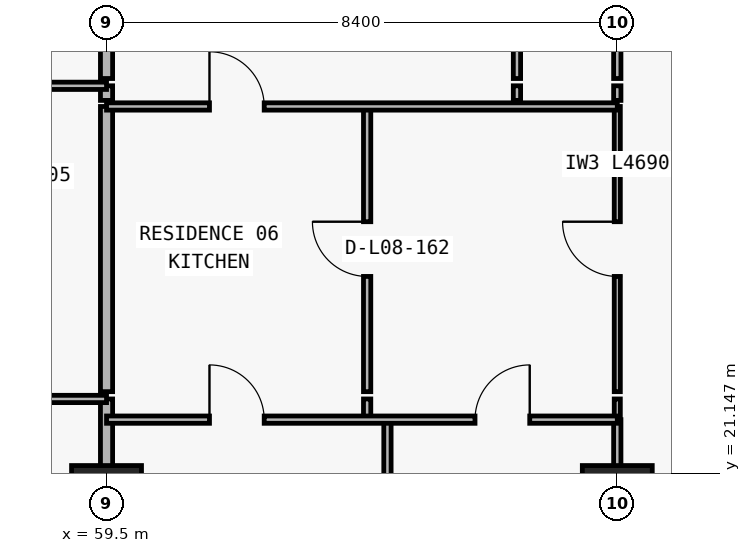
"""IFC4 building model, lengths in metres.
Left out: names, types, materials, properties, quantities, classifications, styles, units other than length and angle.
Written with IfcOpenShell. Run it as: python <this file> out.ifc"""

import sys

from ifc_helpers import new_model, si_unit, direction, frame, frame_2d, origin, origin_2d, place, context, subcontext, project, spatial, rectangle, extrude, element, fill, save


model = new_model("IFC4")
c1 = context("Model", 3, precision=1e-05, world=origin(), true_north=direction((0.0, 1.0)))
c2 = subcontext(c1, "Body", "Model", "MODEL_VIEW")
j1 = project(units=[si_unit("LENGTHUNIT", "METRE"), si_unit("PLANEANGLEUNIT", "RADIAN")], contexts=[c1])
p1 = place(None, origin())
s1 = spatial("IfcSite", under=j1, at=p1, CompositionType="ELEMENT")
p2 = place(p1, origin())
s2 = spatial("IfcBuilding", under=s1, at=p2, CompositionType="ELEMENT")
p3 = place(p2, frame((0.0, 0.0, 36.6)))
s3 = spatial("IfcBuildingStorey", under=s2, at=p3, CompositionType="ELEMENT", Elevation=36.6)
for number, where, z_axis, x_axis in (
    (1, (59.5, 20.8, 0.0), (0.0, 0.0, 1.0), (1.0, 0.0, 0.0)),
    (2, (67.9, 20.8, 0.0), (0.0, 0.0, 1.0), (1.0, 0.0, 0.0)),
):
    element("IfcColumn", number, at=place(p3, frame(where, z_axis=z_axis, x_axis=x_axis)), inside=s3, PredefinedType="COLUMN", context=c2, shape_type="SweptSolid", body=[
        extrude(rectangle(XDim=1.15, YDim=0.95, at=origin_2d()), origin(), (0.0, 0.0, 1.0), 3.05),
    ])
p4 = place(p3, frame((59.5, 6.24, 0.0), z_axis=(0.0, 0.0, 1.0), x_axis=(0.0, 1.0, 0.0)))
e3 = element("IfcWall", 3, at=p4, inside=s3, PredefinedType="PARTITIONING", context=c2, shape_type="SweptSolid", body=[
    extrude(rectangle(XDim=16.13, YDim=0.2, at=frame_2d((8.065, 0.0))), origin(), (0.0, 0.0, 1.0), 2.11),
])
p5 = place(p3, frame((59.5, 22.49, 0.0), z_axis=(0.0, 0.0, 1.0), x_axis=(0.0, 1.0, 0.0)))
e4 = element("IfcWall", 4, at=p5, inside=s3, PredefinedType="PARTITIONING", context=c2, shape_type="SweptSolid", body=[
    extrude(rectangle(XDim=4.69, YDim=0.2, at=frame_2d((2.345, 0.0))), origin(), (0.0, 0.0, 1.0), 2.11),
])
p6 = place(p3, frame((59.5, 27.28, 0.0), z_axis=(0.0, 0.0, 1.0), x_axis=(0.0, 1.0, 0.0)))
e5 = element("IfcWall", 5, at=p6, inside=s3, PredefinedType="PARTITIONING", context=c2, shape_type="SweptSolid", body=[
    extrude(rectangle(XDim=0.24, YDim=0.2, at=frame_2d((0.12, 0.0))), origin(), (0.0, 0.0, 1.0), 2.11),
])
p7 = place(p3, frame((59.5, 27.64, 0.0), z_axis=(0.0, 0.0, 1.0), x_axis=(0.0, 1.0, 0.0)))
e6 = element("IfcWall", 6, at=p7, inside=s3, PredefinedType="PARTITIONING", context=c2, shape_type="SweptSolid", body=[
    extrude(rectangle(XDim=6.86, YDim=0.2, at=frame_2d((3.43, 0.0))), origin(), (0.0, 0.0, 1.0), 2.11),
])
p8 = place(p3, frame((63.786, 22.03, 0.0), z_axis=(0.0, 0.0, 1.0), x_axis=(0.0, 1.0, 0.0)))
e7 = element("IfcWall", 7, at=p8, inside=s3, PredefinedType="PARTITIONING", context=c2, shape_type="SweptSolid", body=[
    extrude(rectangle(XDim=0.34, YDim=0.12, at=frame_2d((0.17, 0.0))), origin(), (0.0, 0.0, 1.0), 3.05),
])
p9 = place(p3, frame((63.786, 22.49, 0.0), z_axis=(0.0, 0.0, 1.0), x_axis=(0.0, 1.0, 0.0)))
e8 = element("IfcWall", 8, at=p9, inside=s3, PredefinedType="PARTITIONING", context=c2, shape_type="SweptSolid", body=[
    extrude(rectangle(XDim=4.69, YDim=0.12, at=frame_2d((2.345, 0.0))), origin(), (0.0, 0.0, 1.0), 3.05),
])
p10 = place(p9, frame((1.895, 0.0, 0.0)))
e9 = element("IfcOpeningElement", 9, at=p10, cuts=e8, PredefinedType="OPENING", context=c2, shape_type="SweptSolid", body=[
    extrude(rectangle(XDim=0.9, YDim=2.15, at=frame_2d((0.45, 1.075))), frame((0.0, 0.07, 0.0), z_axis=(0.0, -1.0, 0.0), x_axis=(1.0, 0.0, 0.0)), (0.0, 0.0, 1.0), 0.14),
])
p11 = place(p3, frame((64.12, 6.24, 0.0), z_axis=(0.0, 0.0, 1.0), x_axis=(0.0, 1.0, 0.0)))
e10 = element("IfcWall", 10, at=p11, inside=s3, PredefinedType="PARTITIONING", context=c2, shape_type="SweptSolid", body=[
    extrude(rectangle(XDim=15.79, YDim=0.12, at=frame_2d((7.895, 0.0))), origin(), (0.0, 0.0, 1.0), 3.05),
])
p12 = place(p3, frame((66.25, 27.28, 0.0), z_axis=(0.0, 0.0, 1.0), x_axis=(0.0, 1.0, 0.0)))
e11 = element("IfcWall", 11, at=p12, inside=s3, PredefinedType="PARTITIONING", context=c2, shape_type="SweptSolid", body=[
    extrude(rectangle(XDim=0.24, YDim=0.12, at=frame_2d((0.12, 0.0))), origin(), (0.0, 0.0, 1.0), 3.05),
])
p13 = place(p3, frame((66.25, 27.64, 0.0), z_axis=(0.0, 0.0, 1.0), x_axis=(0.0, 1.0, 0.0)))
e12 = element("IfcWall", 12, at=p13, inside=s3, PredefinedType="PARTITIONING", context=c2, shape_type="SweptSolid", body=[
    extrude(rectangle(XDim=6.86, YDim=0.12, at=frame_2d((3.43, 0.0))), origin(), (0.0, 0.0, 1.0), 3.05),
])
p14 = place(p13, frame((3.005, 0.0, 0.0)))
e13 = element("IfcOpeningElement", 13, at=p14, cuts=e12, PredefinedType="OPENING", context=c2, shape_type="SweptSolid", body=[
    extrude(rectangle(XDim=0.85, YDim=2.1, at=frame_2d((0.425, 1.05))), frame((0.0, 0.07, 0.0), z_axis=(0.0, -1.0, 0.0), x_axis=(1.0, 0.0, 0.0)), (0.0, 0.0, 1.0), 0.14),
])
p15 = place(p3, frame((67.9, 6.24, 0.0), z_axis=(0.0, 0.0, 1.0), x_axis=(0.0, 1.0, 0.0)))
e14 = element("IfcWall", 14, at=p15, inside=s3, PredefinedType="PARTITIONING", context=c2, shape_type="SweptSolid", body=[
    extrude(rectangle(XDim=15.79, YDim=0.12, at=frame_2d((7.895, 0.0))), origin(), (0.0, 0.0, 1.0), 2.11),
])
p16 = place(p3, frame((67.9, 22.035, 0.0), z_axis=(0.0, 0.0, 1.0), x_axis=(0.0, 1.0, 0.0)))
e15 = element("IfcWall", 15, at=p16, inside=s3, PredefinedType="MOVABLE", context=c2, shape_type="SweptSolid", body=[
    extrude(rectangle(XDim=0.335, YDim=0.1, at=frame_2d((0.167, 0.0))), origin(), (0.0, 0.0, 1.0), 2.11),
])
p17 = place(p3, frame((67.9, 22.49, 0.0), z_axis=(0.0, 0.0, 1.0), x_axis=(0.0, 1.0, 0.0)))
e16 = element("IfcWall", 16, at=p17, inside=s3, PredefinedType="MOVABLE", context=c2, shape_type="SweptSolid", body=[
    extrude(rectangle(XDim=4.69, YDim=0.1, at=frame_2d((2.345, 0.0))), origin(), (0.0, 0.0, 1.0), 2.11),
])
p18 = place(p17, frame((1.895, 0.0, 0.0)))
e17 = element("IfcOpeningElement", 17, at=p18, cuts=e16, PredefinedType="OPENING", context=c2, shape_type="SweptSolid", body=[
    extrude(rectangle(XDim=0.9, YDim=2.06, at=frame_2d((0.45, 1.03))), frame((0.0, 0.06, 0.0), z_axis=(0.0, -1.0, 0.0), x_axis=(1.0, 0.0, 0.0)), (0.0, 0.0, 1.0), 0.12),
])
p19 = place(p3, frame((67.9, 27.28, 0.0), z_axis=(0.0, 0.0, 1.0), x_axis=(0.0, 1.0, 0.0)))
e18 = element("IfcWall", 18, at=p19, inside=s3, PredefinedType="PARTITIONING", context=c2, shape_type="SweptSolid", body=[
    extrude(rectangle(XDim=0.24, YDim=0.12, at=frame_2d((0.12, 0.0))), origin(), (0.0, 0.0, 1.0), 2.11),
])
p20 = place(p3, frame((67.9, 27.64, 0.0), z_axis=(0.0, 0.0, 1.0), x_axis=(0.0, 1.0, 0.0)))
e19 = element("IfcWall", 19, at=p20, inside=s3, PredefinedType="PARTITIONING", context=c2, shape_type="SweptSolid", body=[
    extrude(rectangle(XDim=6.86, YDim=0.12, at=frame_2d((3.43, 0.0))), origin(), (0.0, 0.0, 1.0), 2.11),
])
p21 = place(p3, frame((59.5, 22.03, 0.0), z_axis=(0.0, 0.0, 1.0), x_axis=(1.0, 0.0, 0.0)))
e20 = element("IfcWall", 20, at=p21, inside=s3, PredefinedType="PARTITIONING", context=c2, shape_type="SweptSolid", body=[
    extrude(rectangle(XDim=8.4, YDim=0.12, at=frame_2d((4.2, 0.0))), origin(), (0.0, 0.0, 1.0), 3.05),
])
p22 = place(p21, frame((1.693, 0.0, 0.0)))
e21 = element("IfcOpeningElement", 21, at=p22, cuts=e20, PredefinedType="OPENING", context=c2, shape_type="SweptSolid", body=[
    extrude(rectangle(XDim=0.9, YDim=2.15, at=frame_2d((0.45, 1.075))), frame((0.0, 0.07, 0.0), z_axis=(0.0, -1.0, 0.0), x_axis=(1.0, 0.0, 0.0)), (0.0, 0.0, 1.0), 0.14),
])
p23 = place(p21, frame((6.06, 0.0, 0.0)))
e22 = element("IfcOpeningElement", 22, at=p23, cuts=e20, PredefinedType="OPENING", context=c2, shape_type="SweptSolid", body=[
    extrude(rectangle(XDim=0.9, YDim=2.15, at=frame_2d((0.45, 1.075))), frame((0.0, 0.07, 0.0), z_axis=(0.0, -1.0, 0.0), x_axis=(1.0, 0.0, 0.0)), (0.0, 0.0, 1.0), 0.14),
])
p24 = place(p3, frame((55.9, 22.37, 0.0), z_axis=(0.0, 0.0, 1.0), x_axis=(1.0, 0.0, 0.0)))
e23 = element("IfcWall", 23, at=p24, inside=s3, PredefinedType="PARTITIONING", context=c2, shape_type="SweptSolid", body=[
    extrude(rectangle(XDim=3.6, YDim=0.12, at=frame_2d((1.8, 0.0))), origin(), (0.0, 0.0, 1.0), 3.05),
])
p25 = place(p24, frame((1.35, 0.0, 0.0)))
e24 = element("IfcOpeningElement", 24, at=p25, cuts=e23, PredefinedType="OPENING", context=c2, shape_type="SweptSolid", body=[
    extrude(rectangle(XDim=0.9, YDim=2.15, at=frame_2d((0.45, 1.075))), frame((0.0, 0.07, 0.0), z_axis=(0.0, -1.0, 0.0), x_axis=(1.0, 0.0, 0.0)), (0.0, 0.0, 1.0), 0.14),
])
p26 = place(p3, frame((59.5, 27.18, 0.0), z_axis=(0.0, 0.0, 1.0), x_axis=(1.0, 0.0, 0.0)))
e25 = element("IfcWall", 25, at=p26, inside=s3, PredefinedType="PARTITIONING", context=c2, shape_type="SweptSolid", body=[
    extrude(rectangle(XDim=8.4, YDim=0.12, at=frame_2d((4.2, 0.0))), origin(), (0.0, 0.0, 1.0), 3.05),
])
p27 = place(p26, frame((1.693, 0.0, 0.0)))
e26 = element("IfcOpeningElement", 26, at=p27, cuts=e25, PredefinedType="OPENING", context=c2, shape_type="SweptSolid", body=[
    extrude(rectangle(XDim=0.9, YDim=2.15, at=frame_2d((0.45, 1.075))), frame((0.0, 0.07, 0.0), z_axis=(0.0, -1.0, 0.0), x_axis=(1.0, 0.0, 0.0)), (0.0, 0.0, 1.0), 0.14),
])
p28 = place(p3, frame((55.9, 27.52, 0.0), z_axis=(0.0, 0.0, 1.0), x_axis=(1.0, 0.0, 0.0)))
e27 = element("IfcWall", 27, at=p28, inside=s3, PredefinedType="PARTITIONING", context=c2, shape_type="SweptSolid", body=[
    extrude(rectangle(XDim=3.6, YDim=0.12, at=frame_2d((1.8, 0.0))), origin(), (0.0, 0.0, 1.0), 3.05),
])
p29 = place(p27, origin())
e28 = element("IfcDoor", 28, at=p29, inside=s3, OperationType="SINGLE_SWING_LEFT", PredefinedType="DOOR", context=c2, shape_type="SweptSolid", body=[
    extrude(rectangle(XDim=0.9, YDim=2.15, at=frame_2d((0.45, 1.075))), frame((0.0, 0.025, 0.0), z_axis=(0.0, -1.0, 0.0), x_axis=(1.0, 0.0, 0.0)), (0.0, 0.0, 1.0), 0.05),
])
fill(e26, e28)
p30 = place(p10, origin())
e29 = element("IfcDoor", 29, at=p30, inside=s3, OperationType="SINGLE_SWING_RIGHT", PredefinedType="DOOR", context=c2, shape_type="SweptSolid", body=[
    extrude(rectangle(XDim=0.9, YDim=2.15, at=frame_2d((0.45, 1.075))), frame((0.0, 0.025, 0.0), z_axis=(0.0, -1.0, 0.0), x_axis=(1.0, 0.0, 0.0)), (0.0, 0.0, 1.0), 0.05),
])
fill(e9, e29)
p31 = place(p22, origin())
e30 = element("IfcDoor", 30, at=p31, inside=s3, OperationType="SINGLE_SWING_LEFT", PredefinedType="DOOR", context=c2, shape_type="SweptSolid", body=[
    extrude(rectangle(XDim=0.9, YDim=2.15, at=frame_2d((0.45, 1.075))), frame((0.0, 0.025, 0.0), z_axis=(0.0, -1.0, 0.0), x_axis=(1.0, 0.0, 0.0)), (0.0, 0.0, 1.0), 0.05),
])
fill(e21, e30)
p32 = place(p23, origin())
e31 = element("IfcDoor", 31, at=p32, inside=s3, OperationType="SINGLE_SWING_RIGHT", PredefinedType="DOOR", context=c2, shape_type="SweptSolid", body=[
    extrude(rectangle(XDim=0.9, YDim=2.15, at=frame_2d((0.45, 1.075))), frame((0.0, 0.025, 0.0), z_axis=(0.0, -1.0, 0.0), x_axis=(1.0, 0.0, 0.0)), (0.0, 0.0, 1.0), 0.05),
])
fill(e22, e31)
p33 = place(p18, origin())
e32 = element("IfcDoor", 32, at=p33, inside=s3, OperationType="SINGLE_SWING_RIGHT", PredefinedType="DOOR", context=c2, shape_type="SweptSolid", body=[
    extrude(rectangle(XDim=0.9, YDim=2.06, at=frame_2d((0.45, 1.03))), frame((0.0, 0.025, 0.0), z_axis=(0.0, -1.0, 0.0), x_axis=(1.0, 0.0, 0.0)), (0.0, 0.0, 1.0), 0.05),
])
fill(e17, e32)
save(model, sys.argv[1])
